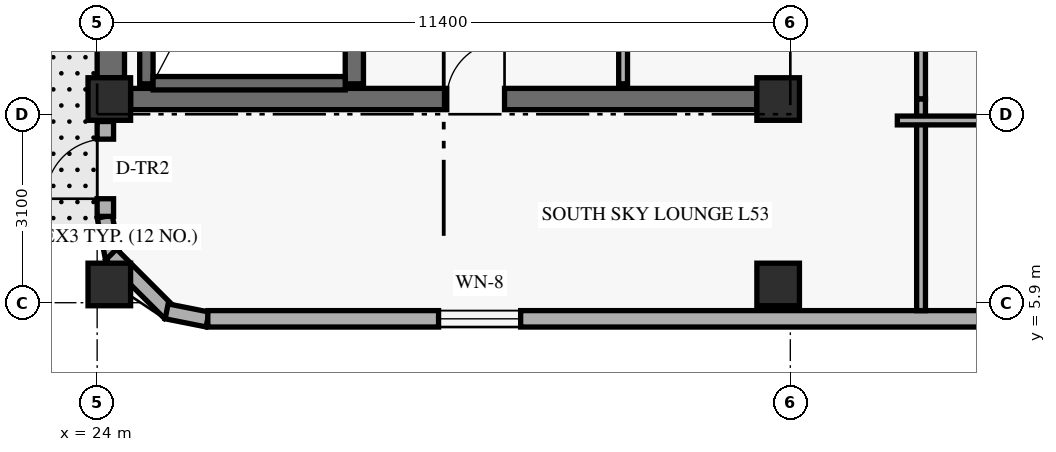
"""IFC4 building model, lengths in metres.
Left out: names, types, materials, properties, quantities, classifications, styles, units other than length and angle.
Written with IfcOpenShell. Run it as: python <this file> out.ifc"""

import sys

from ifc_helpers import new_model, si_unit, direction, frame, frame_2d, origin, origin_2d, place, context, subcontext, project, spatial, rectangle, extrude, element, fill, save


model = new_model("IFC4")
c1 = context("Model", 3, precision=1e-05, world=origin(), true_north=direction((0.0, 1.0)))
c2 = subcontext(c1, "Body", "Model", "MODEL_VIEW")
j1 = project(units=[si_unit("LENGTHUNIT", "METRE"), si_unit("PLANEANGLEUNIT", "RADIAN")], contexts=[c1])
p1 = place(None, origin())
s1 = spatial("IfcSite", under=j1, at=p1, CompositionType="ELEMENT")
p2 = place(p1, origin())
s2 = spatial("IfcBuilding", under=s1, at=p2, CompositionType="ELEMENT")
p3 = place(p2, frame((0.0, 0.0, 205.8)))
s3 = spatial("IfcBuildingStorey", under=s2, at=p3, CompositionType="ELEMENT", Elevation=205.8)
p4 = place(p3, frame((24.225, 9.6, 0.0), z_axis=(0.0, 0.0, 1.0), x_axis=(0.0, 1.0, 0.0)))
e1 = element("IfcWall", 1, at=p4, inside=s3, PredefinedType="SHEAR", context=c2, shape_type="SweptSolid", body=[
    extrude(rectangle(XDim=7.6, YDim=0.45, at=frame_2d((3.8, 0.0))), origin(), (0.0, 0.0, 1.0), 2.821),
])
p5 = place(p3, frame((24.55, 9.25, 0.0), z_axis=(0.0, 0.0, 1.0), x_axis=(1.0, 0.0, 0.0)))
e2 = element("IfcWall", 2, at=p5, inside=s3, PredefinedType="SHEAR", context=c2, shape_type="SweptSolid", body=[
    extrude(rectangle(XDim=10.3, YDim=0.35, at=frame_2d((5.15, 0.0))), origin(), (0.0, 0.0, 1.0), 3.36),
])
p6 = place(p5, frame((5.2, 0.0, 0.0)))
e3 = element("IfcOpeningElement", 3, at=p6, cuts=e2, PredefinedType="OPENING", context=c2, shape_type="SweptSolid", body=[
    extrude(rectangle(XDim=0.95, YDim=2.15, at=frame_2d((0.475, 1.075))), frame((0.0, 0.185, 0.0), z_axis=(0.0, -1.0, 0.0), x_axis=(1.0, 0.0, 0.0)), (0.0, 0.0, 1.0), 0.37),
])
p7 = place(p3, frame((24.81, 9.5, 0.0), z_axis=(0.0, 0.0, 1.0), x_axis=(0.0, 1.0, 0.0)))
e4 = element("IfcWall", 4, at=p7, inside=s3, PredefinedType="SHEAR", context=c2, shape_type="SweptSolid", body=[
    extrude(rectangle(XDim=7.76, YDim=0.22, at=frame_2d((3.88, 0.0))), origin(), (0.0, 0.0, 1.0), 3.36),
])
p8 = place(p3, frame((28.23, 9.5, 0.0), z_axis=(0.0, 0.0, 1.0), x_axis=(0.0, 1.0, 0.0)))
e5 = element("IfcWall", 5, at=p8, inside=s3, PredefinedType="SHEAR", context=c2, shape_type="SweptSolid", body=[
    extrude(rectangle(XDim=7.76, YDim=0.3, at=frame_2d((3.88, 0.0))), origin(), (0.0, 0.0, 1.0), 3.36),
])
p9 = place(p3, frame((24.92, 9.51, 0.0), z_axis=(0.0, 0.0, 1.0), x_axis=(1.0, 0.0, 0.0)))
e6 = element("IfcWall", 6, at=p9, inside=s3, PredefinedType="SHEAR", context=c2, shape_type="SweptSolid", body=[
    extrude(rectangle(XDim=3.16, YDim=0.22, at=frame_2d((1.58, 0.0))), origin(), (0.0, 0.0, 1.0), 3.36),
])
for number, where, z_axis, x_axis in (
    (7, (24.2, 6.2, 0.0), (0.0, 0.0, 1.0), (1.0, 0.0, 0.0)),
    (8, (24.2, 9.25, 0.0), (0.0, 0.0, 1.0), (1.0, 0.0, 0.0)),
    (9, (35.2, 6.2, 0.0), (0.0, 0.0, 1.0), (1.0, 0.0, 0.0)),
    (10, (35.2, 9.25, 0.0), (0.0, 0.0, 1.0), (1.0, 0.0, 0.0)),
):
    element("IfcColumn", number, at=place(p3, frame(where, z_axis=z_axis, x_axis=x_axis)), inside=s3, PredefinedType="COLUMN", context=c2, shape_type="SweptSolid", body=[
        extrude(rectangle(XDim=0.7, YDim=0.7, at=origin_2d()), origin(), (0.0, 0.0, 1.0), 3.6),
    ])
p10 = place(p3, frame((24.124, 7.316, 0.0), z_axis=(0.0, 0.0, 1.0), x_axis=(0.194952956674, -0.980812594069, 0.0)))
e11 = element("IfcWall", 11, at=p10, inside=s3, PredefinedType="SOLIDWALL", context=c2, shape_type="SweptSolid", body=[
    extrude(rectangle(XDim=0.686, YDim=0.25, at=frame_2d((0.343, 0.0))), origin(), (0.0, 0.0, 1.0), 2.803),
])
p11 = place(p3, frame((24.231, 6.694, 0.0), z_axis=(0.0, 0.0, 1.0), x_axis=(0.707106781187, -0.707106781187, 0.0)))
e12 = element("IfcWall", 12, at=p11, inside=s3, PredefinedType="SOLIDWALL", context=c2, shape_type="SweptSolid", body=[
    extrude(rectangle(XDim=1.362, YDim=0.25, at=frame_2d((0.681, 0.0))), origin(), (0.0, 0.0, 1.0), 2.803),
])
p12 = place(p3, frame((25.143, 5.758, 0.0), z_axis=(0.0, 0.0, 1.0), x_axis=(0.980812594069, -0.194952956674, 0.0)))
e13 = element("IfcWall", 13, at=p12, inside=s3, PredefinedType="SOLIDWALL", context=c2, shape_type="SweptSolid", body=[
    extrude(rectangle(XDim=0.686, YDim=0.25, at=frame_2d((0.343, 0.0))), origin(), (0.0, 0.0, 1.0), 3.36),
])
p13 = place(p3, frame((25.82, 5.635, 0.0), z_axis=(0.0, 0.0, 1.0), x_axis=(1.0, 0.0, 0.0)))
e14 = element("IfcWall", 14, at=p13, inside=s3, PredefinedType="SOLIDWALL", context=c2, shape_type="SweptSolid", body=[
    extrude(rectangle(XDim=32.96, YDim=0.27, at=frame_2d((16.48, 0.0))), origin(), (0.0, 0.0, 1.0), 3.36),
])
p14 = place(p13, frame((3.795, 0.0, 0.85)))
e15 = element("IfcOpeningElement", 15, at=p14, cuts=e14, PredefinedType="OPENING", context=c2, shape_type="SweptSolid", body=[
    extrude(rectangle(XDim=1.35, YDim=1.55, at=frame_2d((0.675, 0.775))), frame((0.0, 0.145, 0.0), z_axis=(0.0, -1.0, 0.0), x_axis=(1.0, 0.0, 0.0)), (0.0, 0.0, 1.0), 0.29),
])
p15 = place(p13, frame((15.661, 0.0, 0.85)))
e16 = element("IfcOpeningElement", 16, at=p15, cuts=e14, PredefinedType="OPENING", context=c2, shape_type="SweptSolid", body=[
    extrude(rectangle(XDim=1.35, YDim=1.55, at=frame_2d((0.675, 0.775))), frame((0.0, 0.145, 0.0), z_axis=(0.0, -1.0, 0.0), x_axis=(1.0, 0.0, 0.0)), (0.0, 0.0, 1.0), 0.29),
])
p16 = place(p13, frame((23.83, 0.0, 0.85)))
e17 = element("IfcOpeningElement", 17, at=p16, cuts=e14, PredefinedType="OPENING", context=c2, shape_type="SweptSolid", body=[
    extrude(rectangle(XDim=1.35, YDim=1.55, at=frame_2d((0.675, 0.775))), frame((0.0, 0.145, 0.0), z_axis=(0.0, -1.0, 0.0), x_axis=(1.0, 0.0, 0.0)), (0.0, 0.0, 1.0), 0.29),
])
p17 = place(p13, frame((26.259, 0.0, 0.85)))
e18 = element("IfcOpeningElement", 18, at=p17, cuts=e14, PredefinedType="OPENING", context=c2, shape_type="SweptSolid", body=[
    extrude(rectangle(XDim=1.35, YDim=1.55, at=frame_2d((0.675, 0.775))), frame((0.0, 0.145, 0.0), z_axis=(0.0, -1.0, 0.0), x_axis=(1.0, 0.0, 0.0)), (0.0, 0.0, 1.0), 0.29),
])
p18 = place(p13, frame((31.477, 0.0, 0.85)))
e19 = element("IfcOpeningElement", 19, at=p18, cuts=e14, PredefinedType="OPENING", context=c2, shape_type="SweptSolid", body=[
    extrude(rectangle(XDim=1.2, YDim=1.5, at=frame_2d((0.6, 0.75))), frame((0.0, 0.145, 0.0), z_axis=(0.0, -1.0, 0.0), x_axis=(1.0, 0.0, 0.0)), (0.0, 0.0, 1.0), 0.29),
])
p19 = place(p3, frame((24.135, 7.32, 0.0), z_axis=(0.0, 0.0, 1.0), x_axis=(0.0, 1.0, 0.0)))
e20 = element("IfcWall", 20, at=p19, inside=s3, PredefinedType="SOLIDWALL", context=c2, shape_type="SweptSolid", body=[
    extrude(rectangle(XDim=1.56, YDim=0.27, at=frame_2d((0.78, 0.0))), origin(), (0.0, 0.0, 1.0), 2.803),
])
p20 = place(p19, frame((0.29, 0.0, 0.0)))
e21 = element("IfcOpeningElement", 21, at=p20, cuts=e20, PredefinedType="OPENING", context=c2, shape_type="SweptSolid", body=[
    extrude(rectangle(XDim=0.98, YDim=2.12, at=frame_2d((0.49, 1.06))), frame((0.0, 0.145, 0.0), z_axis=(0.0, -1.0, 0.0), x_axis=(1.0, 0.0, 0.0)), (0.0, 0.0, 1.0), 0.29),
])
p21 = place(p3, frame((32.65, 9.5, 0.0), z_axis=(0.0, 0.0, 1.0), x_axis=(0.0, 1.0, 0.0)))
e22 = element("IfcWall", 22, at=p21, inside=s3, PredefinedType="PARTITIONING", context=c2, shape_type="SweptSolid", body=[
    extrude(rectangle(XDim=6.08, YDim=0.145, at=frame_2d((3.04, 0.0))), origin(), (0.0, 0.0, 1.0), 3.36),
])
p22 = place(p3, frame((37.55, 9.25, 0.0), z_axis=(0.0, 0.0, 1.0), x_axis=(0.0, 1.0, 0.0)))
e23 = element("IfcWall", 23, at=p22, inside=s3, PredefinedType="PARTITIONING", context=c2, shape_type="SweptSolid", body=[
    extrude(rectangle(XDim=6.258, YDim=0.145, at=frame_2d((3.129, 0.0))), origin(), (0.0, 0.0, 1.0), 2.803),
])
p23 = place(p3, frame((37.55, 5.77, 0.0), z_axis=(0.0, 0.0, 1.0), x_axis=(0.0, 1.0, 0.0)))
e24 = element("IfcWall", 24, at=p23, inside=s3, PredefinedType="PARTITIONING", context=c2, shape_type="SweptSolid", body=[
    extrude(rectangle(XDim=3.48, YDim=0.145, at=frame_2d((1.74, 0.0))), origin(), (0.0, 0.0, 1.0), 2.803),
])
p24 = place(p3, frame((37.16, 8.897, 0.0), z_axis=(0.0, 0.0, 1.0), x_axis=(1.0, 0.0, 0.0)))
e25 = element("IfcWall", 25, at=p24, inside=s3, PredefinedType="PARTITIONING", context=c2, shape_type="SweptSolid", body=[
    extrude(rectangle(XDim=12.15, YDim=0.145, at=frame_2d((6.075, 0.0))), origin(), (0.0, 0.0, 1.0), 2.803),
])
p25 = place(p24, frame((3.625, 0.0, 0.0)))
e26 = element("IfcOpeningElement", 26, at=p25, cuts=e25, PredefinedType="OPENING", context=c2, shape_type="SweptSolid", body=[
    extrude(rectangle(XDim=0.9, YDim=2.14, at=frame_2d((0.45, 1.07))), frame((0.0, 0.083, 0.0), z_axis=(0.0, -1.0, 0.0), x_axis=(1.0, 0.0, 0.0)), (0.0, 0.0, 1.0), 0.165),
])
p26 = place(p14, origin())
e27 = element("IfcWindow", 27, at=p26, inside=s3, PartitioningType="SINGLE_PANEL", PredefinedType="WINDOW", context=c2, shape_type="SweptSolid", body=[
    extrude(rectangle(XDim=1.35, YDim=1.55, at=frame_2d((0.675, 0.775))), frame((0.0, 0.03, 0.0), z_axis=(0.0, -1.0, 0.0), x_axis=(1.0, 0.0, 0.0)), (0.0, 0.0, 1.0), 0.06),
])
fill(e15, e27)
p27 = place(p20, origin())
e28 = element("IfcDoor", 28, at=p27, inside=s3, OperationType="SINGLE_SWING_LEFT", PredefinedType="DOOR", context=c2, shape_type="SweptSolid", body=[
    extrude(rectangle(XDim=0.98, YDim=2.12, at=frame_2d((0.49, 1.06))), frame((0.0, 0.025, 0.0), z_axis=(0.0, -1.0, 0.0), x_axis=(1.0, 0.0, 0.0)), (0.0, 0.0, 1.0), 0.05),
])
fill(e21, e28)
p28 = place(p6, frame((0.95, 0.0, 0.0), z_axis=(0.0, 0.0, 1.0), x_axis=(-1.0, 0.0, 0.0)))
e29 = element("IfcDoor", 29, at=p28, inside=s3, OperationType="SINGLE_SWING_LEFT", PredefinedType="DOOR", context=c2, shape_type="SweptSolid", body=[
    extrude(rectangle(XDim=0.95, YDim=2.15, at=frame_2d((0.475, 1.075))), frame((0.0, 0.025, 0.0), z_axis=(0.0, -1.0, 0.0), x_axis=(1.0, 0.0, 0.0)), (0.0, 0.0, 1.0), 0.05),
])
fill(e3, e29)
save(model, sys.argv[1])
